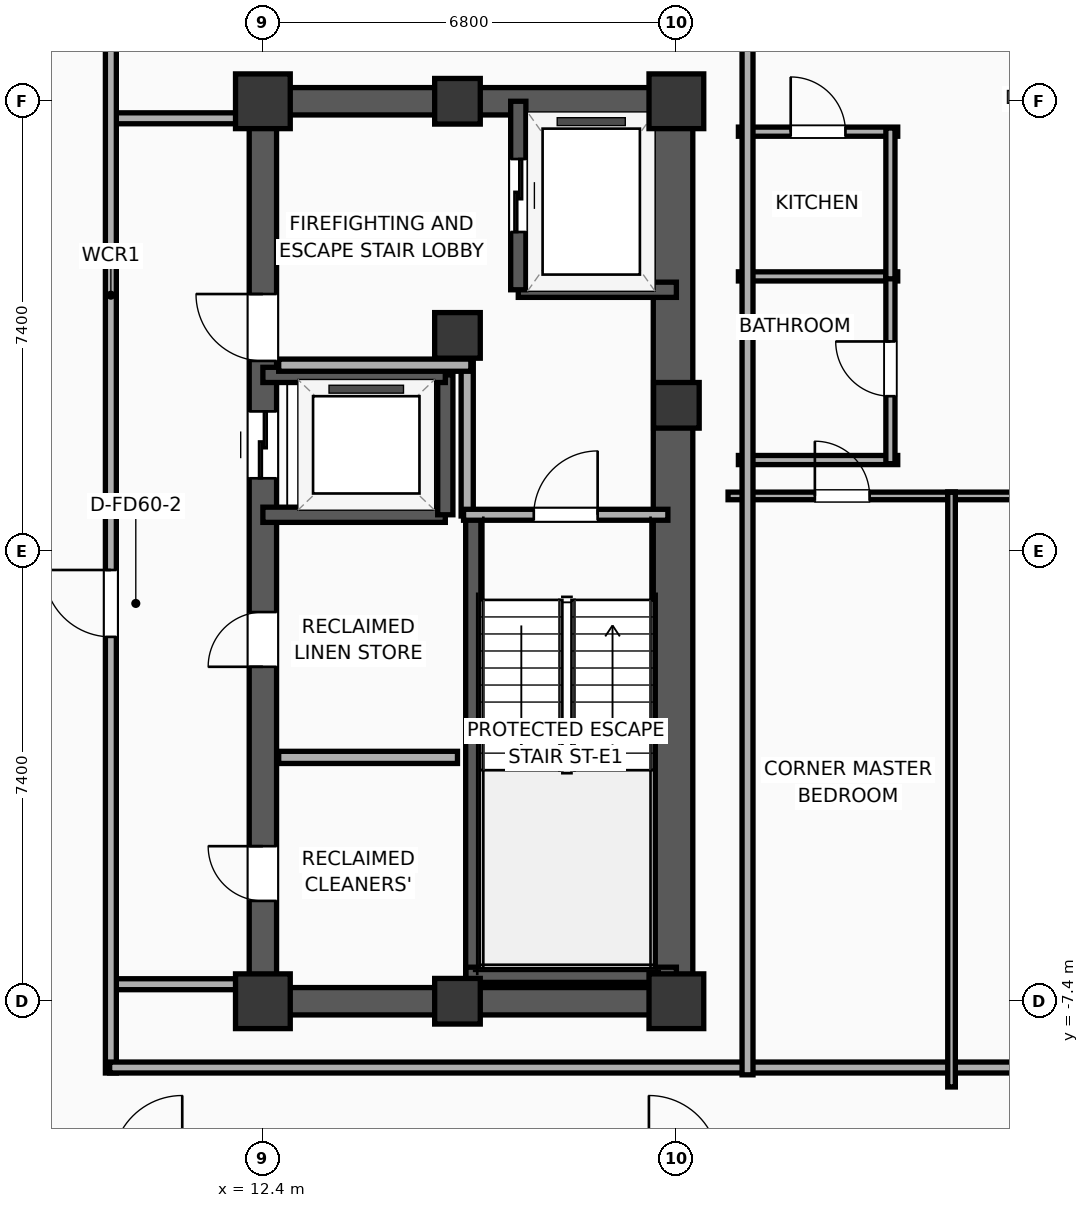
"""IFC4 building model, lengths in metres.
Left out: names, types, materials, properties, quantities, classifications, styles, units other than length and angle.
Written with IfcOpenShell. Run it as: python <this file> out.ifc"""

import sys

from ifc_helpers import new_model, si_unit, direction, frame, frame_2d, origin, origin_2d, place, context, subcontext, project, spatial, rectangle, extrude, element, fill, save


model = new_model("IFC4")
c1 = context("Model", 3, precision=1e-05, world=origin(), true_north=direction((0.0, 1.0)))
c2 = subcontext(c1, "Body", "Model", "MODEL_VIEW")
j1 = project(units=[si_unit("LENGTHUNIT", "METRE"), si_unit("PLANEANGLEUNIT", "RADIAN")], contexts=[c1])
p1 = place(None, origin())
s1 = spatial("IfcSite", under=j1, at=p1, CompositionType="ELEMENT")
p2 = place(p1, origin())
s2 = spatial("IfcBuilding", under=s1, at=p2, CompositionType="ELEMENT")
p3 = place(p2, frame((0.0, 0.0, 235.3)))
s3 = spatial("IfcBuildingStorey", under=s2, at=p3, CompositionType="ELEMENT", Elevation=235.3)
p4 = place(p3, frame((12.4, -7.4, 0.0), z_axis=(0.0, 0.0, 1.0), x_axis=(1.0, 0.0, 0.0)))
e1 = element("IfcColumn", 1, at=p4, inside=s3, PredefinedType="COLUMN", context=c2, shape_type="SweptSolid", body=[
    extrude(rectangle(XDim=0.9, YDim=0.9, at=origin_2d()), origin(), (0.0, 0.0, 1.0), 3.9),
])
p5 = place(p3, frame((15.6, 3.55, 0.0), z_axis=(0.0, 0.0, 1.0), x_axis=(1.0, 0.0, 0.0)))
e2 = element("IfcColumn", 2, at=p5, inside=s3, PredefinedType="COLUMN", context=c2, shape_type="SweptSolid", body=[
    extrude(rectangle(XDim=0.75, YDim=0.75, at=origin_2d()), origin(), (0.0, 0.0, 1.0), 3.9),
])
p6 = place(p3, frame((12.4, 7.4, 0.0), z_axis=(0.0, 0.0, 1.0), x_axis=(1.0, 0.0, 0.0)))
e3 = element("IfcColumn", 3, at=p6, inside=s3, PredefinedType="COLUMN", context=c2, shape_type="SweptSolid", body=[
    extrude(rectangle(XDim=0.9, YDim=0.9, at=origin_2d()), origin(), (0.0, 0.0, 1.0), 3.9),
])
for number, where, z_axis, x_axis in (
    (4, (15.6, -7.4, 0.0), (0.0, 0.0, 1.0), (1.0, 0.0, 0.0)),
    (5, (15.6, 7.4, 0.0), (0.0, 0.0, 1.0), (1.0, 0.0, 0.0)),
):
    element("IfcColumn", number, at=place(p3, frame(where, z_axis=z_axis, x_axis=x_axis)), inside=s3, PredefinedType="COLUMN", context=c2, shape_type="SweptSolid", body=[
        extrude(rectangle(XDim=0.75, YDim=0.75, at=origin_2d()), origin(), (0.0, 0.0, 1.0), 3.9),
    ])
p7 = place(p3, frame((19.2, -7.4, 0.0), z_axis=(0.0, 0.0, 1.0), x_axis=(1.0, 0.0, 0.0)))
e6 = element("IfcColumn", 6, at=p7, inside=s3, PredefinedType="COLUMN", context=c2, shape_type="SweptSolid", body=[
    extrude(rectangle(XDim=0.9, YDim=0.9, at=origin_2d()), origin(), (0.0, 0.0, 1.0), 3.9),
])
p8 = place(p3, frame((19.2, 2.4, 0.0), z_axis=(0.0, 0.0, 1.0), x_axis=(1.0, 0.0, 0.0)))
e7 = element("IfcColumn", 7, at=p8, inside=s3, PredefinedType="COLUMN", context=c2, shape_type="SweptSolid", body=[
    extrude(rectangle(XDim=0.75, YDim=0.75, at=origin_2d()), origin(), (0.0, 0.0, 1.0), 3.9),
])
p9 = place(p3, frame((19.2, 7.4, 0.0), z_axis=(0.0, 0.0, 1.0), x_axis=(1.0, 0.0, 0.0)))
e8 = element("IfcColumn", 8, at=p9, inside=s3, PredefinedType="COLUMN", context=c2, shape_type="SweptSolid", body=[
    extrude(rectangle(XDim=0.9, YDim=0.9, at=origin_2d()), origin(), (0.0, 0.0, 1.0), 3.9),
])
for number, where, z_axis, x_axis in (
    (9, (12.175, -7.4, 0.0), (0.0, 0.0, 1.0), (1.0, 0.0, 0.0)),
    (10, (12.175, 7.4, 0.0), (0.0, 0.0, 1.0), (1.0, 0.0, 0.0)),
):
    element("IfcWall", number, at=place(p3, frame(where, z_axis=z_axis, x_axis=x_axis)), inside=s3, PredefinedType="SHEAR", context=c2, shape_type="SweptSolid", body=[
        extrude(rectangle(XDim=7.25, YDim=0.45, at=frame_2d((3.625, 0.0))), origin(), (0.0, 0.0, 1.0), 3.65),
    ])
p10 = place(p3, frame((12.4, -7.4, 0.0), z_axis=(0.0, 0.0, 1.0), x_axis=(0.0, 1.0, 0.0)))
e11 = element("IfcWall", 11, at=p10, inside=s3, PredefinedType="SHEAR", context=c2, shape_type="SweptSolid", body=[
    extrude(rectangle(XDim=14.8, YDim=0.45, at=frame_2d((7.4, 0.0))), origin(), (0.0, 0.0, 1.0), 3.65),
])
p11 = place(p10, frame((8.6, 0.0, 0.0)))
e12 = element("IfcOpeningElement", 12, at=p11, cuts=e11, PredefinedType="OPENING", context=c2, shape_type="SweptSolid", body=[
    extrude(rectangle(XDim=1.1, YDim=2.05, at=frame_2d((0.55, 1.025))), frame((0.0, 0.235, 0.0), z_axis=(0.0, -1.0, 0.0), x_axis=(1.0, 0.0, 0.0)), (0.0, 0.0, 1.0), 0.47),
])
p12 = place(p10, frame((10.53, 0.0, 0.0)))
e13 = element("IfcOpeningElement", 13, at=p12, cuts=e11, PredefinedType="OPENING", context=c2, shape_type="SweptSolid", body=[
    extrude(rectangle(XDim=1.1, YDim=2.05, at=frame_2d((0.55, 1.025))), frame((0.0, 0.235, 0.0), z_axis=(0.0, -1.0, 0.0), x_axis=(1.0, 0.0, 0.0)), (0.0, 0.0, 1.0), 0.47),
])
p13 = place(p10, frame((1.65, 0.0, 0.0)))
e14 = element("IfcOpeningElement", 14, at=p13, cuts=e11, PredefinedType="OPENING", context=c2, shape_type="SweptSolid", body=[
    extrude(rectangle(XDim=0.9, YDim=2.05, at=frame_2d((0.45, 1.025))), frame((0.0, 0.235, 0.0), z_axis=(0.0, -1.0, 0.0), x_axis=(1.0, 0.0, 0.0)), (0.0, 0.0, 1.0), 0.47),
])
p14 = place(p10, frame((5.5, 0.0, 0.0)))
e15 = element("IfcOpeningElement", 15, at=p14, cuts=e11, PredefinedType="OPENING", context=c2, shape_type="SweptSolid", body=[
    extrude(rectangle(XDim=0.9, YDim=2.05, at=frame_2d((0.45, 1.025))), frame((0.0, 0.235, 0.0), z_axis=(0.0, -1.0, 0.0), x_axis=(1.0, 0.0, 0.0)), (0.0, 0.0, 1.0), 0.47),
])
p15 = place(p3, frame((19.145, -7.4, 0.0), z_axis=(0.0, 0.0, 1.0), x_axis=(0.0, 1.0, 0.0)))
e16 = element("IfcWall", 16, at=p15, inside=s3, PredefinedType="SHEAR", context=c2, shape_type="SweptSolid", body=[
    extrude(rectangle(XDim=14.8, YDim=0.65, at=frame_2d((7.4, 0.0))), origin(), (0.0, 0.0, 1.0), 3.65),
])
p16 = place(p3, frame((15.86, -7.085, 0.0), z_axis=(0.0, 0.0, 1.0), x_axis=(0.0, 1.0, 0.0)))
e17 = element("IfcWall", 17, at=p16, inside=s3, PredefinedType="SOLIDWALL", context=c2, shape_type="SweptSolid", body=[
    extrude(rectangle(XDim=7.685, YDim=0.25, at=frame_2d((3.843, 0.0))), origin(), (0.0, 0.0, 1.0), 3.65),
])
p17 = place(p3, frame((15.74, -6.965, 0.0), z_axis=(0.0, 0.0, 1.0), x_axis=(1.0, 0.0, 0.0)))
e18 = element("IfcWall", 18, at=p17, inside=s3, PredefinedType="SOLIDWALL", context=c2, shape_type="SweptSolid", body=[
    extrude(rectangle(XDim=3.46, YDim=0.25, at=frame_2d((1.73, 0.0))), origin(), (0.0, 0.0, 1.0), 3.65),
])
p18 = place(p3, frame((16.6, 4.3, 0.0), z_axis=(0.0, 0.0, 1.0), x_axis=(1.0, 0.0, 0.0)))
e19 = element("IfcWall", 19, at=p18, inside=s3, PredefinedType="SOLIDWALL", context=c2, shape_type="SweptSolid", body=[
    extrude(rectangle(XDim=2.6, YDim=0.25, at=frame_2d((1.3, 0.0))), origin(), (0.0, 0.0, 1.0), 3.65),
])
p19 = place(p3, frame((16.6, 7.4, 0.0), z_axis=(0.0, 0.0, 1.0), x_axis=(0.0, -1.0, 0.0)))
e20 = element("IfcWall", 20, at=p19, inside=s3, PredefinedType="SOLIDWALL", context=c2, shape_type="SweptSolid", body=[
    extrude(rectangle(XDim=3.1, YDim=0.25, at=frame_2d((1.55, 0.0))), origin(), (0.0, 0.0, 1.0), 3.65),
])
p20 = place(p19, frame((0.95, 0.0, 0.0)))
e21 = element("IfcOpeningElement", 21, at=p20, cuts=e20, PredefinedType="OPENING", context=c2, shape_type="SweptSolid", body=[
    extrude(rectangle(XDim=1.2, YDim=2.05, at=frame_2d((0.6, 1.025))), frame((0.0, 0.135, 0.0), z_axis=(0.0, -1.0, 0.0), x_axis=(1.0, 0.0, 0.0)), (0.0, 0.0, 1.0), 0.27),
])
p21 = place(p3, frame((12.4, 0.6, 0.0), z_axis=(0.0, 0.0, 1.0), x_axis=(1.0, 0.0, 0.0)))
e22 = element("IfcWall", 22, at=p21, inside=s3, PredefinedType="SOLIDWALL", context=c2, shape_type="SweptSolid", body=[
    extrude(rectangle(XDim=3.0, YDim=0.25, at=frame_2d((1.5, 0.0))), origin(), (0.0, 0.0, 1.0), 3.65),
])
p22 = place(p3, frame((15.4, 0.6, 0.0), z_axis=(0.0, 0.0, 1.0), x_axis=(0.0, 1.0, 0.0)))
e23 = element("IfcWall", 23, at=p22, inside=s3, PredefinedType="SOLIDWALL", context=c2, shape_type="SweptSolid", body=[
    extrude(rectangle(XDim=2.3, YDim=0.25, at=frame_2d((1.15, 0.0))), origin(), (0.0, 0.0, 1.0), 3.65),
])
p23 = place(p3, frame((15.4, 2.9, 0.0), z_axis=(0.0, 0.0, 1.0), x_axis=(-1.0, 0.0, 0.0)))
e24 = element("IfcWall", 24, at=p23, inside=s3, PredefinedType="SOLIDWALL", context=c2, shape_type="SweptSolid", body=[
    extrude(rectangle(XDim=3.0, YDim=0.25, at=frame_2d((1.5, 0.0))), origin(), (0.0, 0.0, 1.0), 3.65),
])
p24 = place(p3, frame((15.76, 0.58, 0.0), z_axis=(0.0, 0.0, 1.0), x_axis=(0.0, 1.0, 0.0)))
e25 = element("IfcWall", 25, at=p24, inside=s3, PredefinedType="PARTITIONING", context=c2, shape_type="SweptSolid", body=[
    extrude(rectangle(XDim=2.52, YDim=0.2, at=frame_2d((1.26, 0.0))), origin(), (0.0, 0.0, 1.0), 3.65),
])
p25 = place(p3, frame((12.66, 3.06, 0.0), z_axis=(0.0, 0.0, 1.0), x_axis=(1.0, 0.0, 0.0)))
e26 = element("IfcWall", 26, at=p25, inside=s3, PredefinedType="PARTITIONING", context=c2, shape_type="SweptSolid", body=[
    extrude(rectangle(XDim=3.16, YDim=0.2, at=frame_2d((1.58, 0.0))), origin(), (0.0, 0.0, 1.0), 3.65),
])
p26 = place(p3, frame((15.7, 0.6, 0.0), z_axis=(0.0, 0.0, 1.0), x_axis=(1.0, 0.0, 0.0)))
e27 = element("IfcWall", 27, at=p26, inside=s3, PredefinedType="PARTITIONING", context=c2, shape_type="SweptSolid", body=[
    extrude(rectangle(XDim=3.36, YDim=0.18, at=frame_2d((1.68, 0.0))), origin(), (0.0, 0.0, 1.0), 3.65),
])
p27 = place(p26, frame((1.155, 0.0, 0.0)))
e28 = element("IfcOpeningElement", 28, at=p27, cuts=e27, PredefinedType="OPENING", context=c2, shape_type="SweptSolid", body=[
    extrude(rectangle(XDim=1.05, YDim=2.05, at=frame_2d((0.525, 1.025))), frame((0.0, 0.1, 0.0), z_axis=(0.0, -1.0, 0.0), x_axis=(1.0, 0.0, 0.0)), (0.0, 0.0, 1.0), 0.2),
])
p28 = place(p3, frame((12.66, -3.39, 0.0), z_axis=(0.0, 0.0, 1.0), x_axis=(1.0, 0.0, 0.0)))
e29 = element("IfcWall", 29, at=p28, inside=s3, PredefinedType="PARTITIONING", context=c2, shape_type="SweptSolid", body=[
    extrude(rectangle(XDim=2.94, YDim=0.2, at=frame_2d((1.47, 0.0))), origin(), (0.0, 0.0, 1.0), 3.65),
])
for number, where, z_axis, x_axis in (
    (30, (9.88, 7.12, 0.0), (0.0, 0.0, 1.0), (1.0, 0.0, 0.0)),
    (31, (9.88, -7.12, 0.0), (0.0, 0.0, 1.0), (1.0, 0.0, 0.0)),
):
    element("IfcWall", number, at=place(p3, frame(where, z_axis=z_axis, x_axis=x_axis)), inside=s3, PredefinedType="PARTITIONING", context=c2, shape_type="SweptSolid", body=[
        extrude(rectangle(XDim=2.27, YDim=0.18, at=frame_2d((1.135, 0.0))), origin(), (0.0, 0.0, 1.0), 3.65),
    ])
p29 = place(p3, frame((9.9, -8.58, 0.0), z_axis=(0.0, 0.0, 1.0), x_axis=(0.0, 1.0, 0.0)))
e32 = element("IfcWall", 32, at=p29, inside=s3, PredefinedType="PARTITIONING", context=c2, shape_type="SweptSolid", body=[
    extrude(rectangle(XDim=17.16, YDim=0.18, at=frame_2d((8.58, 0.0))), origin(), (0.0, 0.0, 1.0), 3.65),
])
p30 = place(p29, frame((7.172, 0.0, 0.0)))
e33 = element("IfcOpeningElement", 33, at=p30, cuts=e32, PredefinedType="OPENING", context=c2, shape_type="SweptSolid", body=[
    extrude(rectangle(XDim=1.1, YDim=2.05, at=frame_2d((0.55, 1.025))), frame((0.0, 0.1, 0.0), z_axis=(0.0, -1.0, 0.0), x_axis=(1.0, 0.0, 0.0)), (0.0, 0.0, 1.0), 0.2),
])
p31 = place(p3, frame((9.88, -8.49, 0.0), z_axis=(0.0, 0.0, 1.0), x_axis=(1.0, 0.0, 0.0)))
e34 = element("IfcWall", 34, at=p31, inside=s3, PredefinedType="PARTITIONING", context=c2, shape_type="SweptSolid", body=[
    extrude(rectangle(XDim=20.35, YDim=0.18, at=frame_2d((10.175, 0.0))), origin(), (0.0, 0.0, 1.0), 3.65),
])
p32 = place(p3, frame((20.22, 6.9, 0.0), z_axis=(0.0, 0.0, 1.0), x_axis=(1.0, 0.0, 0.0)))
e35 = element("IfcWall", 35, at=p32, inside=s3, PredefinedType="PLUMBINGWALL", context=c2, shape_type="SweptSolid", body=[
    extrude(rectangle(XDim=2.62, YDim=0.15, at=frame_2d((1.31, 0.0))), origin(), (0.0, 0.0, 1.0), 3.65),
])
p33 = place(p32, frame((0.86, 0.0, 0.0)))
e36 = element("IfcOpeningElement", 36, at=p33, cuts=e35, PredefinedType="OPENING", context=c2, shape_type="SweptSolid", body=[
    extrude(rectangle(XDim=0.9, YDim=2.05, at=frame_2d((0.45, 1.025))), frame((0.0, 0.085, 0.0), z_axis=(0.0, -1.0, 0.0), x_axis=(1.0, 0.0, 0.0)), (0.0, 0.0, 1.0), 0.17),
])
for number, where, z_axis, x_axis in (
    (37, (20.22, 4.52, 0.0), (0.0, 0.0, 1.0), (1.0, 0.0, 0.0)),
    (38, (20.22, 1.5, 0.0), (0.0, 0.0, 1.0), (1.0, 0.0, 0.0)),
):
    element("IfcWall", number, at=place(p3, frame(where, z_axis=z_axis, x_axis=x_axis)), inside=s3, PredefinedType="PLUMBINGWALL", context=c2, shape_type="SweptSolid", body=[
        extrude(rectangle(XDim=2.62, YDim=0.15, at=frame_2d((1.31, 0.0))), origin(), (0.0, 0.0, 1.0), 3.65),
    ])
p34 = place(p3, frame((22.72, 1.44, 0.0), z_axis=(0.0, 0.0, 1.0), x_axis=(0.0, 1.0, 0.0)))
e39 = element("IfcWall", 39, at=p34, inside=s3, PredefinedType="PLUMBINGWALL", context=c2, shape_type="SweptSolid", body=[
    extrude(rectangle(XDim=3.12, YDim=0.15, at=frame_2d((1.56, 0.0))), origin(), (0.0, 0.0, 1.0), 3.65),
])
p35 = place(p34, frame((1.11, 0.0, 0.0)))
e40 = element("IfcOpeningElement", 40, at=p35, cuts=e39, PredefinedType="OPENING", context=c2, shape_type="SweptSolid", body=[
    extrude(rectangle(XDim=0.9, YDim=2.05, at=frame_2d((0.45, 1.025))), frame((0.0, 0.085, 0.0), z_axis=(0.0, -1.0, 0.0), x_axis=(1.0, 0.0, 0.0)), (0.0, 0.0, 1.0), 0.17),
])
p36 = place(p3, frame((22.72, 4.48, 0.0), z_axis=(0.0, 0.0, 1.0), x_axis=(0.0, 1.0, 0.0)))
e41 = element("IfcWall", 41, at=p36, inside=s3, PredefinedType="PLUMBINGWALL", context=c2, shape_type="SweptSolid", body=[
    extrude(rectangle(XDim=2.48, YDim=0.15, at=frame_2d((1.24, 0.0))), origin(), (0.0, 0.0, 1.0), 3.65),
])
p37 = place(p3, frame((20.05, 0.91, 0.0), z_axis=(0.0, 0.0, 1.0), x_axis=(1.0, 0.0, 0.0)))
e42 = element("IfcWall", 42, at=p37, inside=s3, PredefinedType="PARTITIONING", context=c2, shape_type="SweptSolid", body=[
    extrude(rectangle(XDim=3.738, YDim=0.125, at=frame_2d((1.869, 0.0))), origin(), (0.0, 0.0, 1.0), 3.65),
])
p38 = place(p37, frame((1.427, 0.0, 0.0)))
e43 = element("IfcOpeningElement", 43, at=p38, cuts=e42, PredefinedType="OPENING", context=c2, shape_type="SweptSolid", body=[
    extrude(rectangle(XDim=0.9, YDim=2.05, at=frame_2d((0.45, 1.025))), frame((0.0, 0.073, 0.0), z_axis=(0.0, -1.0, 0.0), x_axis=(1.0, 0.0, 0.0)), (0.0, 0.0, 1.0), 0.145),
])
p39 = place(p3, frame((23.663, 0.91, 0.0), z_axis=(0.0, 0.0, 1.0), x_axis=(1.0, 0.0, 0.0)))
e44 = element("IfcWall", 44, at=p39, inside=s3, PredefinedType="PARTITIONING", context=c2, shape_type="SweptSolid", body=[
    extrude(rectangle(XDim=3.381, YDim=0.125, at=frame_2d((1.69, 0.0))), origin(), (0.0, 0.0, 1.0), 3.65),
])
p40 = place(p39, frame((1.24, 0.0, 0.0)))
e45 = element("IfcOpeningElement", 45, at=p40, cuts=e44, PredefinedType="OPENING", context=c2, shape_type="SweptSolid", body=[
    extrude(rectangle(XDim=0.9, YDim=2.05, at=frame_2d((0.45, 1.025))), frame((0.0, 0.073, 0.0), z_axis=(0.0, -1.0, 0.0), x_axis=(1.0, 0.0, 0.0)), (0.0, 0.0, 1.0), 0.145),
])
p41 = place(p3, frame((23.725, -8.81, 0.0), z_axis=(0.0, 0.0, 1.0), x_axis=(0.0, 1.0, 0.0)))
e46 = element("IfcWall", 46, at=p41, inside=s3, PredefinedType="PARTITIONING", context=c2, shape_type="SweptSolid", body=[
    extrude(rectangle(XDim=9.78, YDim=0.125, at=frame_2d((4.89, 0.0))), origin(), (0.0, 0.0, 1.0), 3.65),
])
p42 = place(p3, frame((20.37, -8.61, 0.0), z_axis=(0.0, 0.0, 1.0), x_axis=(0.0, 1.0, 0.0)))
e47 = element("IfcWall", 47, at=p42, inside=s3, PredefinedType="PARTITIONING", context=c2, shape_type="SweptSolid", body=[
    extrude(rectangle(XDim=17.22, YDim=0.18, at=frame_2d((8.61, 0.0))), origin(), (0.0, 0.0, 1.0), 3.65),
])
p43 = place(p20, origin())
e48 = element("IfcDoor", 48, at=p43, inside=s3, OperationType="SLIDING_TO_LEFT", PredefinedType="DOOR", context=c2, shape_type="SweptSolid", body=[
    extrude(rectangle(XDim=1.2, YDim=2.05, at=frame_2d((0.6, 1.025))), frame((0.0, 0.025, 0.0), z_axis=(0.0, -1.0, 0.0), x_axis=(1.0, 0.0, 0.0)), (0.0, 0.0, 1.0), 0.05),
])
fill(e21, e48)
p44 = place(p11, origin())
e49 = element("IfcDoor", 49, at=p44, inside=s3, OperationType="SLIDING_TO_LEFT", PredefinedType="DOOR", context=c2, shape_type="SweptSolid", body=[
    extrude(rectangle(XDim=1.1, YDim=2.05, at=frame_2d((0.55, 1.025))), frame((0.0, 0.025, 0.0), z_axis=(0.0, -1.0, 0.0), x_axis=(1.0, 0.0, 0.0)), (0.0, 0.0, 1.0), 0.05),
])
fill(e12, e49)
p45 = place(p27, origin())
e50 = element("IfcDoor", 50, at=p45, inside=s3, OperationType="SINGLE_SWING_RIGHT", PredefinedType="DOOR", context=c2, shape_type="SweptSolid", body=[
    extrude(rectangle(XDim=1.05, YDim=2.05, at=frame_2d((0.525, 1.025))), frame((0.0, 0.025, 0.0), z_axis=(0.0, -1.0, 0.0), x_axis=(1.0, 0.0, 0.0)), (0.0, 0.0, 1.0), 0.05),
])
fill(e28, e50)
p46 = place(p30, origin())
e51 = element("IfcDoor", 51, at=p46, inside=s3, OperationType="SINGLE_SWING_RIGHT", PredefinedType="DOOR", context=c2, shape_type="SweptSolid", body=[
    extrude(rectangle(XDim=1.1, YDim=2.05, at=frame_2d((0.55, 1.025))), frame((0.0, 0.025, 0.0), z_axis=(0.0, -1.0, 0.0), x_axis=(1.0, 0.0, 0.0)), (0.0, 0.0, 1.0), 0.05),
])
fill(e33, e51)
p47 = place(p33, origin())
e52 = element("IfcDoor", 52, at=p47, inside=s3, OperationType="SINGLE_SWING_LEFT", PredefinedType="DOOR", context=c2, shape_type="SweptSolid", body=[
    extrude(rectangle(XDim=0.9, YDim=2.05, at=frame_2d((0.45, 1.025))), frame((0.0, 0.025, 0.0), z_axis=(0.0, -1.0, 0.0), x_axis=(1.0, 0.0, 0.0)), (0.0, 0.0, 1.0), 0.05),
])
fill(e36, e52)
p48 = place(p35, origin())
e53 = element("IfcDoor", 53, at=p48, inside=s3, OperationType="SINGLE_SWING_RIGHT", PredefinedType="DOOR", context=c2, shape_type="SweptSolid", body=[
    extrude(rectangle(XDim=0.9, YDim=2.05, at=frame_2d((0.45, 1.025))), frame((0.0, 0.025, 0.0), z_axis=(0.0, -1.0, 0.0), x_axis=(1.0, 0.0, 0.0)), (0.0, 0.0, 1.0), 0.05),
])
fill(e40, e53)
p49 = place(p38, origin())
e54 = element("IfcDoor", 54, at=p49, inside=s3, OperationType="SINGLE_SWING_LEFT", PredefinedType="DOOR", context=c2, shape_type="SweptSolid", body=[
    extrude(rectangle(XDim=0.9, YDim=2.05, at=frame_2d((0.45, 1.025))), frame((0.0, 0.025, 0.0), z_axis=(0.0, -1.0, 0.0), x_axis=(1.0, 0.0, 0.0)), (0.0, 0.0, 1.0), 0.05),
])
fill(e43, e54)
p50 = place(p12, origin())
e55 = element("IfcDoor", 55, at=p50, inside=s3, OperationType="SINGLE_SWING_RIGHT", PredefinedType="DOOR", context=c2, shape_type="SweptSolid", body=[
    extrude(rectangle(XDim=1.1, YDim=2.05, at=frame_2d((0.55, 1.025))), frame((0.0, 0.025, 0.0), z_axis=(0.0, -1.0, 0.0), x_axis=(1.0, 0.0, 0.0)), (0.0, 0.0, 1.0), 0.05),
])
fill(e13, e55)
p51 = place(p13, origin())
e56 = element("IfcDoor", 56, at=p51, inside=s3, OperationType="SINGLE_SWING_RIGHT", PredefinedType="DOOR", context=c2, shape_type="SweptSolid", body=[
    extrude(rectangle(XDim=0.9, YDim=2.05, at=frame_2d((0.45, 1.025))), frame((0.0, 0.025, 0.0), z_axis=(0.0, -1.0, 0.0), x_axis=(1.0, 0.0, 0.0)), (0.0, 0.0, 1.0), 0.05),
])
fill(e14, e56)
p52 = place(p14, origin())
e57 = element("IfcDoor", 57, at=p52, inside=s3, OperationType="SINGLE_SWING_LEFT", PredefinedType="DOOR", context=c2, shape_type="SweptSolid", body=[
    extrude(rectangle(XDim=0.9, YDim=2.05, at=frame_2d((0.45, 1.025))), frame((0.0, 0.025, 0.0), z_axis=(0.0, -1.0, 0.0), x_axis=(1.0, 0.0, 0.0)), (0.0, 0.0, 1.0), 0.05),
])
fill(e15, e57)
save(model, sys.argv[1])
